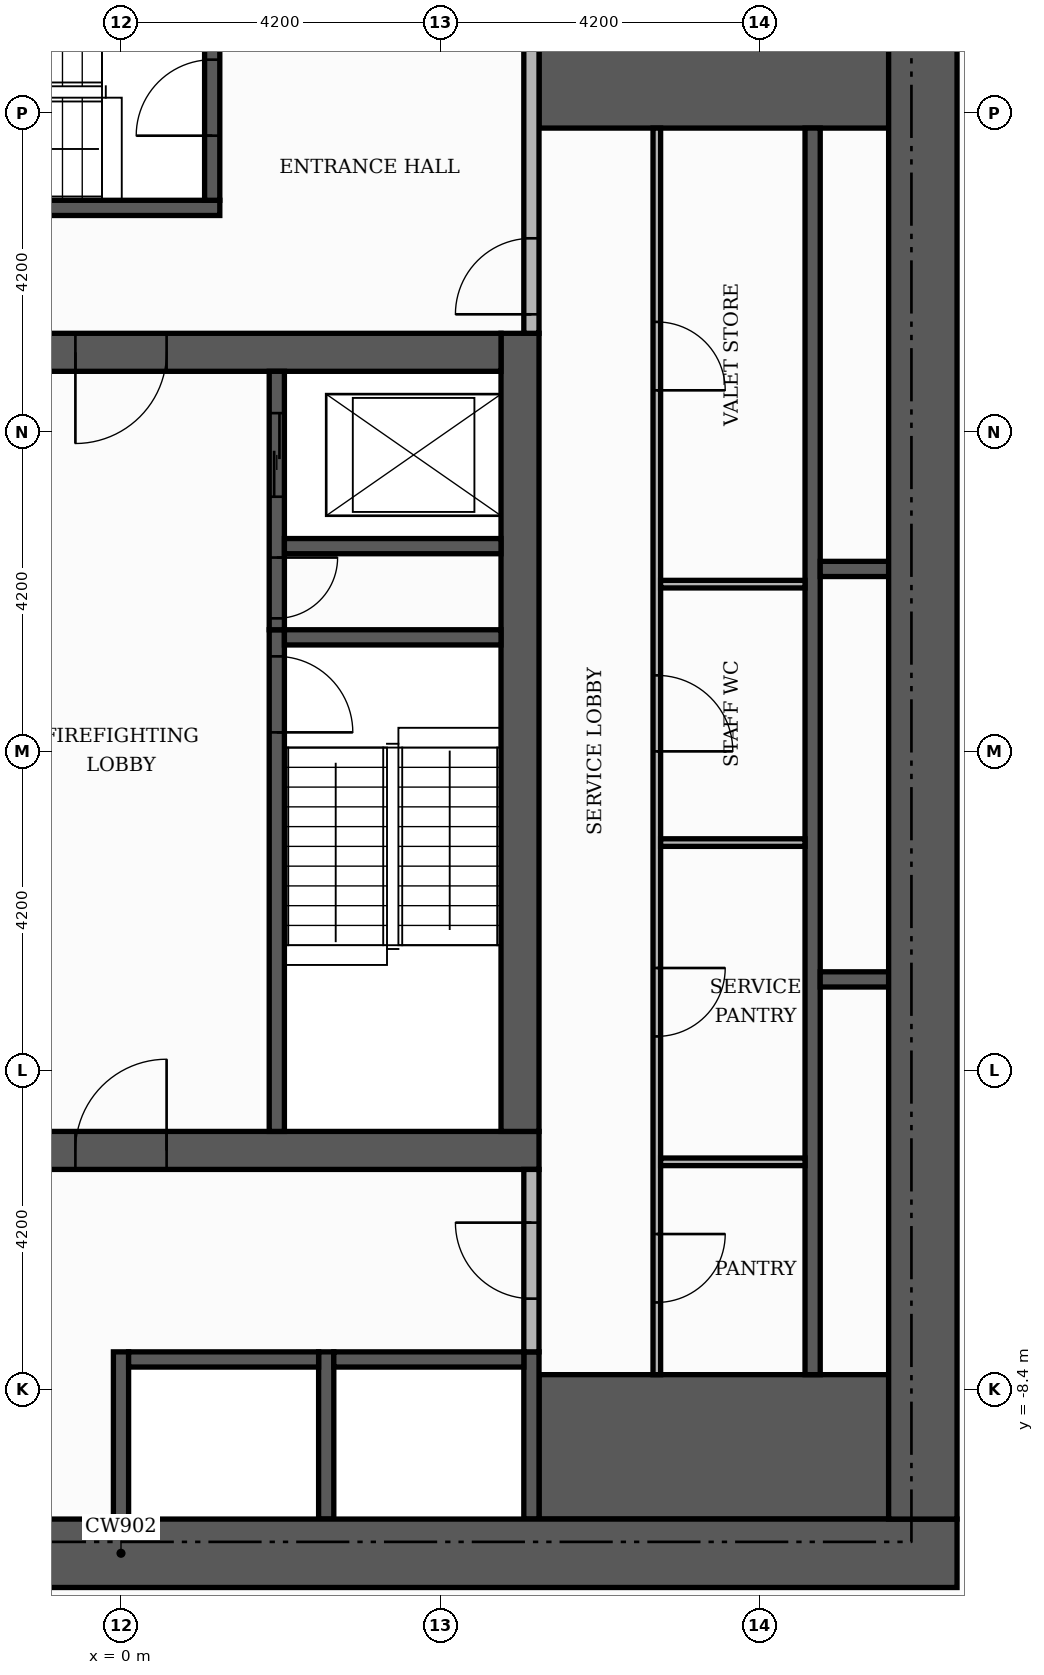
"""IFC4 building model, lengths in metres.
Left out: names, types, materials, properties, quantities, classifications, styles, units other than length and angle.
Written with IfcOpenShell. Run it as: python <this file> out.ifc"""

import sys

from ifc_helpers import new_model, si_unit, direction, frame, frame_2d, origin, place, context, subcontext, project, spatial, rectangle, extrude, element, fill, save


model = new_model("IFC4")
c1 = context("Model", 3, precision=1e-05, world=origin(), true_north=direction((0.0, 1.0)))
c2 = subcontext(c1, "Body", "Model", "MODEL_VIEW")
j1 = project(units=[si_unit("LENGTHUNIT", "METRE"), si_unit("PLANEANGLEUNIT", "RADIAN")], contexts=[c1])
p1 = place(None, origin())
s1 = spatial("IfcSite", under=j1, at=p1, CompositionType="ELEMENT")
p2 = place(p1, origin())
s2 = spatial("IfcBuilding", under=s1, at=p2, CompositionType="ELEMENT")
p3 = place(p2, frame((0.0, 0.0, 79.2)))
s3 = spatial("IfcBuildingStorey", under=s2, at=p3, CompositionType="ELEMENT", Elevation=79.2)
p4 = place(p3, frame((-5.5, -5.25, 0.0), z_axis=(0.0, 0.0, 1.0), x_axis=(1.0, 0.0, 0.0)))
e1 = element("IfcWall", 1, at=p4, inside=s3, PredefinedType="SHEAR", context=c2, shape_type="SweptSolid", body=[
    extrude(rectangle(XDim=11.0, YDim=0.5, at=frame_2d((5.5, 0.0))), origin(), (0.0, 0.0, 1.0), 3.48),
])
p5 = place(p4, frame((4.9, 0.0, 0.0)))
e2 = element("IfcOpeningElement", 2, at=p5, cuts=e1, PredefinedType="OPENING", context=c2, shape_type="SweptSolid", body=[
    extrude(rectangle(XDim=1.2, YDim=2.1, at=frame_2d((0.6, 1.05))), frame((0.0, 0.26, 0.0), z_axis=(0.0, -1.0, 0.0), x_axis=(1.0, 0.0, 0.0)), (0.0, 0.0, 1.0), 0.52),
])
p6 = place(p3, frame((5.25, -5.0, 0.0), z_axis=(0.0, 0.0, 1.0), x_axis=(0.0, 1.0, 0.0)))
e3 = element("IfcWall", 3, at=p6, inside=s3, PredefinedType="SHEAR", context=c2, shape_type="SweptSolid", body=[
    extrude(rectangle(XDim=10.5, YDim=0.5, at=frame_2d((5.25, 0.0))), origin(), (0.0, 0.0, 1.0), 3.48),
])
p7 = place(p3, frame((-5.0, 5.25, 0.0), z_axis=(0.0, 0.0, 1.0), x_axis=(1.0, 0.0, 0.0)))
e4 = element("IfcWall", 4, at=p7, inside=s3, PredefinedType="SHEAR", context=c2, shape_type="SweptSolid", body=[
    extrude(rectangle(XDim=10.0, YDim=0.5, at=frame_2d((5.0, 0.0))), origin(), (0.0, 0.0, 1.0), 3.48),
])
p8 = place(p7, frame((4.4, 0.0, 0.0)))
e5 = element("IfcOpeningElement", 5, at=p8, cuts=e4, PredefinedType="OPENING", context=c2, shape_type="SweptSolid", body=[
    extrude(rectangle(XDim=1.2, YDim=2.1, at=frame_2d((0.6, 1.05))), frame((0.0, 0.26, 0.0), z_axis=(0.0, -1.0, 0.0), x_axis=(1.0, 0.0, 0.0)), (0.0, 0.0, 1.0), 0.52),
])
for number, where, z_axis, x_axis in (
    (6, (5.5, -9.15, 0.0), (0.0, 0.0, 1.0), (1.0, 0.0, 0.0)),
    (7, (5.5, 9.15, 0.0), (0.0, 0.0, 1.0), (1.0, 0.0, 0.0)),
):
    element("IfcWall", number, at=place(p3, frame(where, z_axis=z_axis, x_axis=x_axis)), inside=s3, PredefinedType="SHEAR", context=c2, shape_type="SweptSolid", body=[
        extrude(rectangle(XDim=4.6, YDim=1.9, at=frame_2d((2.3, 0.0))), origin(), (0.0, 0.0, 1.0), 3.48),
    ])
p9 = place(p3, frame((2.05, -5.0, 0.0), z_axis=(0.0, 0.0, 1.0), x_axis=(0.0, 1.0, 0.0)))
e8 = element("IfcWall", 8, at=p9, inside=s3, PredefinedType="SHEAR", context=c2, shape_type="SweptSolid", body=[
    extrude(rectangle(XDim=6.6, YDim=0.2, at=frame_2d((3.3, 0.0))), origin(), (0.0, 0.0, 1.0), 3.48),
])
p10 = place(p9, frame((5.25, 0.0, 0.0)))
e9 = element("IfcOpeningElement", 9, at=p10, cuts=e8, PredefinedType="OPENING", context=c2, shape_type="SweptSolid", body=[
    extrude(rectangle(XDim=1.0, YDim=2.1, at=frame_2d((0.5, 1.05))), frame((0.0, 0.11, 0.0), z_axis=(0.0, -1.0, 0.0), x_axis=(1.0, 0.0, 0.0)), (0.0, 0.0, 1.0), 0.22),
])
p11 = place(p3, frame((2.15, 1.5, 0.0), z_axis=(0.0, 0.0, 1.0), x_axis=(1.0, 0.0, 0.0)))
e10 = element("IfcWall", 10, at=p11, inside=s3, PredefinedType="SHEAR", context=c2, shape_type="SweptSolid", body=[
    extrude(rectangle(XDim=2.85, YDim=0.2, at=frame_2d((1.425, 0.0))), origin(), (0.0, 0.0, 1.0), 3.48),
])
p12 = place(p3, frame((-5.5, 7.15, 0.0), z_axis=(0.0, 0.0, 1.0), x_axis=(1.0, 0.0, 0.0)))
e11 = element("IfcWall", 11, at=p12, inside=s3, PredefinedType="SHEAR", context=c2, shape_type="SweptSolid", body=[
    extrude(rectangle(XDim=6.8, YDim=0.2, at=frame_2d((3.4, 0.0))), origin(), (0.0, 0.0, 1.0), 3.48),
])
p13 = place(p3, frame((1.2, 7.25, 0.0), z_axis=(0.0, 0.0, 1.0), x_axis=(0.0, 1.0, 0.0)))
e12 = element("IfcWall", 12, at=p13, inside=s3, PredefinedType="SHEAR", context=c2, shape_type="SweptSolid", body=[
    extrude(rectangle(XDim=2.85, YDim=0.2, at=frame_2d((1.425, 0.0))), origin(), (0.0, 0.0, 1.0), 3.48),
])
p14 = place(p13, frame((0.85, 0.0, 0.0)))
e13 = element("IfcOpeningElement", 13, at=p14, cuts=e12, PredefinedType="OPENING", context=c2, shape_type="SweptSolid", body=[
    extrude(rectangle(XDim=1.0, YDim=2.1, at=frame_2d((0.5, 1.05))), frame((0.0, 0.11, 0.0), z_axis=(0.0, -1.0, 0.0), x_axis=(1.0, 0.0, 0.0)), (0.0, 0.0, 1.0), 0.22),
])
for number, where, z_axis, x_axis in (
    (14, (0.0, -10.1, 0.0), (0.0, 0.0, 1.0), (0.0, 1.0, 0.0)),
    (15, (2.7, -10.1, 0.0), (0.0, 0.0, 1.0), (0.0, 1.0, 0.0)),
    (16, (5.4, -10.1, 0.0), (0.0, 0.0, 1.0), (0.0, 1.0, 0.0)),
):
    element("IfcWall", number, at=place(p3, frame(where, z_axis=z_axis, x_axis=x_axis)), inside=s3, PredefinedType="SHEAR", context=c2, shape_type="SweptSolid", body=[
        extrude(rectangle(XDim=2.2, YDim=0.2, at=frame_2d((1.1, 0.0))), origin(), (0.0, 0.0, 1.0), 3.48),
    ])
p15 = place(p3, frame((9.1, -8.2, 0.0), z_axis=(0.0, 0.0, 1.0), x_axis=(0.0, 1.0, 0.0)))
e17 = element("IfcWall", 17, at=p15, inside=s3, PredefinedType="SHEAR", context=c2, shape_type="SweptSolid", body=[
    extrude(rectangle(XDim=16.4, YDim=0.2, at=frame_2d((8.2, 0.0))), origin(), (0.0, 0.0, 1.0), 3.48),
])
for number, where, z_axis, x_axis in (
    (18, (0.1, -8.0, 0.0), (0.0, 0.0, 1.0), (1.0, 0.0, 0.0)),
    (19, (2.8, -8.0, 0.0), (0.0, 0.0, 1.0), (1.0, 0.0, 0.0)),
):
    element("IfcWall", number, at=place(p3, frame(where, z_axis=z_axis, x_axis=x_axis)), inside=s3, PredefinedType="SHEAR", context=c2, shape_type="SweptSolid", body=[
        extrude(rectangle(XDim=2.5, YDim=0.2, at=frame_2d((1.25, 0.0))), origin(), (0.0, 0.0, 1.0), 3.48),
    ])
p16 = place(p3, frame((9.2, -3.0, 0.0), z_axis=(0.0, 0.0, 1.0), x_axis=(1.0, 0.0, 0.0)))
e20 = element("IfcWall", 20, at=p16, inside=s3, PredefinedType="SHEAR", context=c2, shape_type="SweptSolid", body=[
    extrude(rectangle(XDim=0.9, YDim=0.2, at=frame_2d((0.45, 0.0))), origin(), (0.0, 0.0, 1.0), 3.48),
])
p17 = place(p3, frame((2.05, 1.6, 0.0), z_axis=(0.0, 0.0, 1.0), x_axis=(0.0, 1.0, 0.0)))
e21 = element("IfcWall", 21, at=p17, inside=s3, PredefinedType="SHEAR", context=c2, shape_type="SweptSolid", body=[
    extrude(rectangle(XDim=3.4, YDim=0.2, at=frame_2d((1.7, 0.0))), origin(), (0.0, 0.0, 1.0), 3.48),
])
p18 = place(p17, frame((1.75, 0.0, 0.0)))
e22 = element("IfcOpeningElement", 22, at=p18, cuts=e21, PredefinedType="OPENING", context=c2, shape_type="SweptSolid", body=[
    extrude(rectangle(XDim=1.1, YDim=2.1, at=frame_2d((0.55, 1.05))), frame((0.0, 0.11, 0.0), z_axis=(0.0, -1.0, 0.0), x_axis=(1.0, 0.0, 0.0)), (0.0, 0.0, 1.0), 0.22),
])
p19 = place(p17, frame((0.15, 0.0, 0.0)))
e23 = element("IfcOpeningElement", 23, at=p19, cuts=e21, PredefinedType="OPENING", context=c2, shape_type="SweptSolid", body=[
    extrude(rectangle(XDim=0.8, YDim=2.1, at=frame_2d((0.4, 1.05))), frame((0.0, 0.11, 0.0), z_axis=(0.0, -1.0, 0.0), x_axis=(1.0, 0.0, 0.0)), (0.0, 0.0, 1.0), 0.22),
])
p20 = place(p3, frame((9.2, 2.4, 0.0), z_axis=(0.0, 0.0, 1.0), x_axis=(1.0, 0.0, 0.0)))
e24 = element("IfcWall", 24, at=p20, inside=s3, PredefinedType="SHEAR", context=c2, shape_type="SweptSolid", body=[
    extrude(rectangle(XDim=0.9, YDim=0.2, at=frame_2d((0.45, 0.0))), origin(), (0.0, 0.0, 1.0), 3.48),
])
p21 = place(p3, frame((2.15, 2.7, 0.0), z_axis=(0.0, 0.0, 1.0), x_axis=(1.0, 0.0, 0.0)))
e25 = element("IfcWall", 25, at=p21, inside=s3, PredefinedType="SHEAR", context=c2, shape_type="SweptSolid", body=[
    extrude(rectangle(XDim=2.85, YDim=0.2, at=frame_2d((1.425, 0.0))), origin(), (0.0, 0.0, 1.0), 3.48),
])
p22 = place(p3, frame((-11.0, -10.55, 0.0), z_axis=(0.0, 0.0, 1.0), x_axis=(1.0, 0.0, 0.0)))
e26 = element("IfcWall", 26, at=p22, inside=s3, PredefinedType="SHEAR", context=c2, shape_type="SweptSolid", body=[
    extrude(rectangle(XDim=22.0, YDim=0.9, at=frame_2d((11.0, 0.0))), origin(), (0.0, 0.0, 1.0), 3.48),
])
p23 = place(p22, frame((7.4, 0.0, 0.0)))
e27 = element("IfcOpeningElement", 27, at=p23, cuts=e26, PredefinedType="OPENING", context=c2, shape_type="SweptSolid", body=[
    extrude(rectangle(XDim=1.8, YDim=2.2, at=frame_2d((0.9, 1.1))), frame((0.0, 0.46, 0.0), z_axis=(0.0, -1.0, 0.0), x_axis=(1.0, 0.0, 0.0)), (0.0, 0.0, 1.0), 0.92),
])
p24 = place(p3, frame((10.55, -10.1, 0.0), z_axis=(0.0, 0.0, 1.0), x_axis=(0.0, 1.0, 0.0)))
e28 = element("IfcWall", 28, at=p24, inside=s3, PredefinedType="SHEAR", context=c2, shape_type="SweptSolid", body=[
    extrude(rectangle(XDim=20.2, YDim=0.9, at=frame_2d((10.1, 0.0))), origin(), (0.0, 0.0, 1.0), 3.48),
])
p25 = place(p3, frame((7.05, -8.2, 0.0), z_axis=(0.0, 0.0, 1.0), x_axis=(0.0, 1.0, 0.0)))
e29 = element("IfcWall", 29, at=p25, inside=s3, PredefinedType="PARTITIONING", context=c2, shape_type="SweptSolid", body=[
    extrude(rectangle(XDim=16.4, YDim=0.1, at=frame_2d((8.2, 0.0))), origin(), (0.0, 0.0, 1.0), 3.48),
])
p26 = place(p25, frame((0.95, 0.0, 0.0)))
e30 = element("IfcOpeningElement", 30, at=p26, cuts=e29, PredefinedType="OPENING", context=c2, shape_type="SweptSolid", body=[
    extrude(rectangle(XDim=0.9, YDim=2.1, at=frame_2d((0.45, 1.05))), frame((0.0, 0.06, 0.0), z_axis=(0.0, -1.0, 0.0), x_axis=(1.0, 0.0, 0.0)), (0.0, 0.0, 1.0), 0.12),
])
p27 = place(p25, frame((4.45, 0.0, 0.0)))
e31 = element("IfcOpeningElement", 31, at=p27, cuts=e29, PredefinedType="OPENING", context=c2, shape_type="SweptSolid", body=[
    extrude(rectangle(XDim=0.9, YDim=2.1, at=frame_2d((0.45, 1.05))), frame((0.0, 0.06, 0.0), z_axis=(0.0, -1.0, 0.0), x_axis=(1.0, 0.0, 0.0)), (0.0, 0.0, 1.0), 0.12),
])
p28 = place(p25, frame((8.2, 0.0, 0.0)))
e32 = element("IfcOpeningElement", 32, at=p28, cuts=e29, PredefinedType="OPENING", context=c2, shape_type="SweptSolid", body=[
    extrude(rectangle(XDim=1.0, YDim=2.1, at=frame_2d((0.5, 1.05))), frame((0.0, 0.06, 0.0), z_axis=(0.0, -1.0, 0.0), x_axis=(1.0, 0.0, 0.0)), (0.0, 0.0, 1.0), 0.12),
])
p29 = place(p25, frame((12.95, 0.0, 0.0)))
e33 = element("IfcOpeningElement", 33, at=p29, cuts=e29, PredefinedType="OPENING", context=c2, shape_type="SweptSolid", body=[
    extrude(rectangle(XDim=0.9, YDim=2.1, at=frame_2d((0.45, 1.05))), frame((0.0, 0.06, 0.0), z_axis=(0.0, -1.0, 0.0), x_axis=(1.0, 0.0, 0.0)), (0.0, 0.0, 1.0), 0.12),
])
p30 = place(p3, frame((5.4, -7.9, 0.0), z_axis=(0.0, 0.0, 1.0), x_axis=(0.0, 1.0, 0.0)))
e34 = element("IfcWall", 34, at=p30, inside=s3, PredefinedType="PARTITIONING", context=c2, shape_type="SweptSolid", body=[
    extrude(rectangle(XDim=2.4, YDim=0.2, at=frame_2d((1.2, 0.0))), origin(), (0.0, 0.0, 1.0), 3.48),
])
p31 = place(p30, frame((0.7, 0.0, 0.0)))
e35 = element("IfcOpeningElement", 35, at=p31, cuts=e34, PredefinedType="OPENING", context=c2, shape_type="SweptSolid", body=[
    extrude(rectangle(XDim=1.0, YDim=2.1, at=frame_2d((0.5, 1.05))), frame((0.0, 0.11, 0.0), z_axis=(0.0, -1.0, 0.0), x_axis=(1.0, 0.0, 0.0)), (0.0, 0.0, 1.0), 0.22),
])
for number, where, z_axis, x_axis in (
    (36, (7.1, -5.4, 0.0), (0.0, 0.0, 1.0), (1.0, 0.0, 0.0)),
    (37, (7.1, -1.2, 0.0), (0.0, 0.0, 1.0), (1.0, 0.0, 0.0)),
    (38, (7.1, 2.2, 0.0), (0.0, 0.0, 1.0), (1.0, 0.0, 0.0)),
):
    element("IfcWall", number, at=place(p3, frame(where, z_axis=z_axis, x_axis=x_axis)), inside=s3, PredefinedType="PARTITIONING", context=c2, shape_type="SweptSolid", body=[
        extrude(rectangle(XDim=1.9, YDim=0.1, at=frame_2d((0.95, 0.0))), origin(), (0.0, 0.0, 1.0), 3.48),
    ])
p32 = place(p3, frame((5.4, 5.5, 0.0), z_axis=(0.0, 0.0, 1.0), x_axis=(0.0, 1.0, 0.0)))
e39 = element("IfcWall", 39, at=p32, inside=s3, PredefinedType="PARTITIONING", context=c2, shape_type="SweptSolid", body=[
    extrude(rectangle(XDim=4.6, YDim=0.2, at=frame_2d((2.3, 0.0))), origin(), (0.0, 0.0, 1.0), 3.48),
])
p33 = place(p32, frame((0.25, 0.0, 0.0)))
e40 = element("IfcOpeningElement", 40, at=p33, cuts=e39, PredefinedType="OPENING", context=c2, shape_type="SweptSolid", body=[
    extrude(rectangle(XDim=1.0, YDim=2.1, at=frame_2d((0.5, 1.05))), frame((0.0, 0.11, 0.0), z_axis=(0.0, -1.0, 0.0), x_axis=(1.0, 0.0, 0.0)), (0.0, 0.0, 1.0), 0.22),
])
p34 = place(p18, origin())
e41 = element("IfcDoor", 41, at=p34, inside=s3, OperationType="SLIDING_TO_LEFT", PredefinedType="DOOR", context=c2, shape_type="SweptSolid", body=[
    extrude(rectangle(XDim=1.1, YDim=2.1, at=frame_2d((0.55, 1.05))), frame((0.0, 0.025, 0.0), z_axis=(0.0, -1.0, 0.0), x_axis=(1.0, 0.0, 0.0)), (0.0, 0.0, 1.0), 0.05),
])
fill(e22, e41)
p35 = place(p10, frame((1.0, 0.0, 0.0), z_axis=(0.0, 0.0, 1.0), x_axis=(-1.0, 0.0, 0.0)))
e42 = element("IfcDoor", 42, at=p35, inside=s3, OperationType="SINGLE_SWING_LEFT", PredefinedType="DOOR", context=c2, shape_type="SweptSolid", body=[
    extrude(rectangle(XDim=1.0, YDim=2.1, at=frame_2d((0.5, 1.05))), frame((0.0, 0.025, 0.0), z_axis=(0.0, -1.0, 0.0), x_axis=(1.0, 0.0, 0.0)), (0.0, 0.0, 1.0), 0.05),
])
fill(e9, e42)
p36 = place(p19, frame((0.8, 0.0, 0.0), z_axis=(0.0, 0.0, 1.0), x_axis=(-1.0, 0.0, 0.0)))
e43 = element("IfcDoor", 43, at=p36, inside=s3, OperationType="SINGLE_SWING_RIGHT", PredefinedType="DOOR", context=c2, shape_type="SweptSolid", body=[
    extrude(rectangle(XDim=0.8, YDim=2.1, at=frame_2d((0.4, 1.05))), frame((0.0, 0.025, 0.0), z_axis=(0.0, -1.0, 0.0), x_axis=(1.0, 0.0, 0.0)), (0.0, 0.0, 1.0), 0.05),
])
fill(e23, e43)
p37 = place(p8, frame((1.2, 0.0, 0.0), z_axis=(0.0, 0.0, 1.0), x_axis=(-1.0, 0.0, 0.0)))
e44 = element("IfcDoor", 44, at=p37, inside=s3, OperationType="SINGLE_SWING_LEFT", PredefinedType="DOOR", context=c2, shape_type="SweptSolid", body=[
    extrude(rectangle(XDim=1.2, YDim=2.1, at=frame_2d((0.6, 1.05))), frame((0.0, 0.025, 0.0), z_axis=(0.0, -1.0, 0.0), x_axis=(1.0, 0.0, 0.0)), (0.0, 0.0, 1.0), 0.05),
])
fill(e5, e44)
p38 = place(p5, origin())
e45 = element("IfcDoor", 45, at=p38, inside=s3, OperationType="SINGLE_SWING_RIGHT", PredefinedType="DOOR", context=c2, shape_type="SweptSolid", body=[
    extrude(rectangle(XDim=1.2, YDim=2.1, at=frame_2d((0.6, 1.05))), frame((0.0, 0.025, 0.0), z_axis=(0.0, -1.0, 0.0), x_axis=(1.0, 0.0, 0.0)), (0.0, 0.0, 1.0), 0.05),
])
fill(e2, e45)
p39 = place(p14, origin())
e46 = element("IfcDoor", 46, at=p39, inside=s3, OperationType="SINGLE_SWING_LEFT", PredefinedType="DOOR", context=c2, shape_type="SweptSolid", body=[
    extrude(rectangle(XDim=1.0, YDim=2.1, at=frame_2d((0.5, 1.05))), frame((0.0, 0.025, 0.0), z_axis=(0.0, -1.0, 0.0), x_axis=(1.0, 0.0, 0.0)), (0.0, 0.0, 1.0), 0.05),
])
fill(e13, e46)
p40 = place(p33, origin())
e47 = element("IfcDoor", 47, at=p40, inside=s3, OperationType="SINGLE_SWING_LEFT", PredefinedType="DOOR", context=c2, shape_type="SweptSolid", body=[
    extrude(rectangle(XDim=1.0, YDim=2.1, at=frame_2d((0.5, 1.05))), frame((0.0, 0.025, 0.0), z_axis=(0.0, -1.0, 0.0), x_axis=(1.0, 0.0, 0.0)), (0.0, 0.0, 1.0), 0.05),
])
fill(e40, e47)
p41 = place(p31, origin())
e48 = element("IfcDoor", 48, at=p41, inside=s3, OperationType="SINGLE_SWING_RIGHT", PredefinedType="DOOR", context=c2, shape_type="SweptSolid", body=[
    extrude(rectangle(XDim=1.0, YDim=2.1, at=frame_2d((0.5, 1.05))), frame((0.0, 0.025, 0.0), z_axis=(0.0, -1.0, 0.0), x_axis=(1.0, 0.0, 0.0)), (0.0, 0.0, 1.0), 0.05),
])
fill(e35, e48)
p42 = place(p26, frame((0.9, 0.0, 0.0), z_axis=(0.0, 0.0, 1.0), x_axis=(-1.0, 0.0, 0.0)))
e49 = element("IfcDoor", 49, at=p42, inside=s3, OperationType="SINGLE_SWING_RIGHT", PredefinedType="DOOR", context=c2, shape_type="SweptSolid", body=[
    extrude(rectangle(XDim=0.9, YDim=2.1, at=frame_2d((0.45, 1.05))), frame((0.0, 0.025, 0.0), z_axis=(0.0, -1.0, 0.0), x_axis=(1.0, 0.0, 0.0)), (0.0, 0.0, 1.0), 0.05),
])
fill(e30, e49)
p43 = place(p27, frame((0.9, 0.0, 0.0), z_axis=(0.0, 0.0, 1.0), x_axis=(-1.0, 0.0, 0.0)))
e50 = element("IfcDoor", 50, at=p43, inside=s3, OperationType="SINGLE_SWING_RIGHT", PredefinedType="DOOR", context=c2, shape_type="SweptSolid", body=[
    extrude(rectangle(XDim=0.9, YDim=2.1, at=frame_2d((0.45, 1.05))), frame((0.0, 0.025, 0.0), z_axis=(0.0, -1.0, 0.0), x_axis=(1.0, 0.0, 0.0)), (0.0, 0.0, 1.0), 0.05),
])
fill(e31, e50)
p44 = place(p28, frame((1.0, 0.0, 0.0), z_axis=(0.0, 0.0, 1.0), x_axis=(-1.0, 0.0, 0.0)))
e51 = element("IfcDoor", 51, at=p44, inside=s3, OperationType="SINGLE_SWING_LEFT", PredefinedType="DOOR", context=c2, shape_type="SweptSolid", body=[
    extrude(rectangle(XDim=1.0, YDim=2.1, at=frame_2d((0.5, 1.05))), frame((0.0, 0.025, 0.0), z_axis=(0.0, -1.0, 0.0), x_axis=(1.0, 0.0, 0.0)), (0.0, 0.0, 1.0), 0.05),
])
fill(e32, e51)
p45 = place(p29, frame((0.9, 0.0, 0.0), z_axis=(0.0, 0.0, 1.0), x_axis=(-1.0, 0.0, 0.0)))
e52 = element("IfcDoor", 52, at=p45, inside=s3, OperationType="SINGLE_SWING_LEFT", PredefinedType="DOOR", context=c2, shape_type="SweptSolid", body=[
    extrude(rectangle(XDim=0.9, YDim=2.1, at=frame_2d((0.45, 1.05))), frame((0.0, 0.025, 0.0), z_axis=(0.0, -1.0, 0.0), x_axis=(1.0, 0.0, 0.0)), (0.0, 0.0, 1.0), 0.05),
])
fill(e33, e52)
save(model, sys.argv[1])
